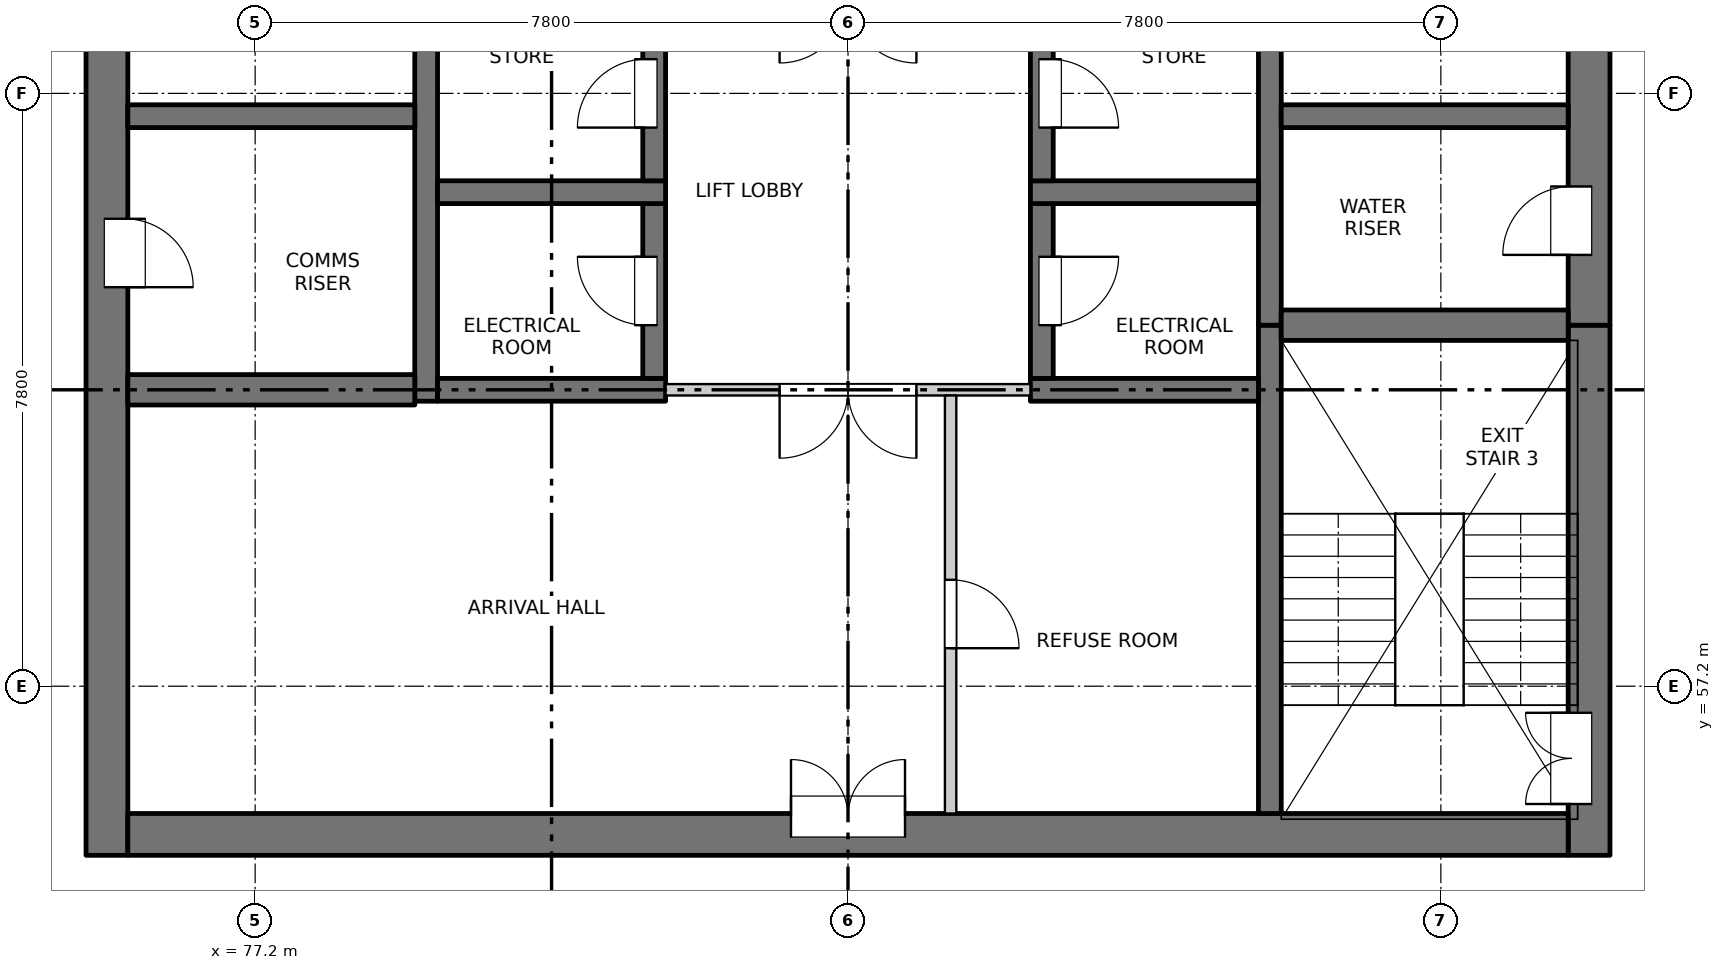
"""IFC4 building model, lengths in metres.
Left out: names, types, materials, properties, quantities, classifications, styles, units other than length and angle.
Written with IfcOpenShell. Run it as: python <this file> out.ifc"""

import sys

from ifc_helpers import new_model, si_unit, direction, frame, frame_2d, origin, place, context, subcontext, project, spatial, rectangle, extrude, element, fill, save


model = new_model("IFC4")
c1 = context("Model", 3, precision=1e-05, world=origin(), true_north=direction((0.0, 1.0)))
c2 = subcontext(c1, "Body", "Model", "MODEL_VIEW")
j1 = project(units=[si_unit("LENGTHUNIT", "METRE"), si_unit("PLANEANGLEUNIT", "RADIAN")], contexts=[c1])
p1 = place(None, origin())
s1 = spatial("IfcSite", under=j1, at=p1, CompositionType="ELEMENT")
p2 = place(p1, origin())
s2 = spatial("IfcBuilding", under=s1, at=p2, CompositionType="ELEMENT")
p3 = place(p2, frame((0.0, 0.0, 189.4)))
s3 = spatial("IfcBuildingStorey", under=s2, at=p3, CompositionType="ELEMENT", Elevation=189.4)
p4 = place(p3, frame((75.25, 54.975, -0.25), z_axis=(0.0, 0.0, 1.0), x_axis=(0.0, 1.0, 0.0)))
e1 = element("IfcWall", 1, at=p4, inside=s3, PredefinedType="SOLIDWALL", context=c2, shape_type="SweptSolid", body=[
    extrude(rectangle(XDim=22.325, YDim=0.55, at=frame_2d((11.163, 0.0))), origin(), (0.0, 0.0, 1.0), 3.35),
])
p5 = place(p4, frame((7.475, 0.0, 0.25)))
e2 = element("IfcOpeningElement", 2, at=p5, cuts=e1, PredefinedType="OPENING", context=c2, shape_type="SweptSolid", body=[
    extrude(rectangle(XDim=0.9, YDim=2.1, at=frame_2d((0.45, 1.05))), frame((0.0, 0.285, 0.0), z_axis=(0.0, -1.0, 0.0), x_axis=(1.0, 0.0, 0.0)), (0.0, 0.0, 1.0), 0.57),
])
p6 = place(p4, frame((10.775, 0.0, 0.25)))
e3 = element("IfcOpeningElement", 3, at=p6, cuts=e1, PredefinedType="OPENING", context=c2, shape_type="SweptSolid", body=[
    extrude(rectangle(XDim=0.9, YDim=2.1, at=frame_2d((0.45, 1.05))), frame((0.0, 0.285, 0.0), z_axis=(0.0, -1.0, 0.0), x_axis=(1.0, 0.0, 0.0)), (0.0, 0.0, 1.0), 0.57),
])
p7 = place(p4, frame((13.775, 0.0, 0.25)))
e4 = element("IfcOpeningElement", 4, at=p7, cuts=e1, PredefinedType="OPENING", context=c2, shape_type="SweptSolid", body=[
    extrude(rectangle(XDim=0.9, YDim=2.1, at=frame_2d((0.45, 1.05))), frame((0.0, 0.285, 0.0), z_axis=(0.0, -1.0, 0.0), x_axis=(1.0, 0.0, 0.0)), (0.0, 0.0, 1.0), 0.57),
])
p8 = place(p4, frame((16.775, 0.0, 0.25)))
e5 = element("IfcOpeningElement", 5, at=p8, cuts=e1, PredefinedType="OPENING", context=c2, shape_type="SweptSolid", body=[
    extrude(rectangle(XDim=0.9, YDim=2.1, at=frame_2d((0.45, 1.05))), frame((0.0, 0.285, 0.0), z_axis=(0.0, -1.0, 0.0), x_axis=(1.0, 0.0, 0.0)), (0.0, 0.0, 1.0), 0.57),
])
p9 = place(p4, frame((20.075, 0.0, 0.25)))
e6 = element("IfcOpeningElement", 6, at=p9, cuts=e1, PredefinedType="OPENING", context=c2, shape_type="SweptSolid", body=[
    extrude(rectangle(XDim=0.9, YDim=2.1, at=frame_2d((0.45, 1.05))), frame((0.0, 0.285, 0.0), z_axis=(0.0, -1.0, 0.0), x_axis=(1.0, 0.0, 0.0)), (0.0, 0.0, 1.0), 0.57),
])
p10 = place(p3, frame((94.75, 54.975, -0.25), z_axis=(0.0, 0.0, 1.0), x_axis=(0.0, 1.0, 0.0)))
e7 = element("IfcWall", 7, at=p10, inside=s3, PredefinedType="SOLIDWALL", context=c2, shape_type="SweptSolid", body=[
    extrude(rectangle(XDim=6.975, YDim=0.55, at=frame_2d((3.487, 0.0))), origin(), (0.0, 0.0, 1.0), 3.35),
])
p11 = place(p10, frame((0.675, 0.0, 0.25)))
e8 = element("IfcOpeningElement", 8, at=p11, cuts=e7, PredefinedType="OPENING", context=c2, shape_type="SweptSolid", body=[
    extrude(rectangle(XDim=1.2, YDim=2.1, at=frame_2d((0.6, 1.05))), frame((0.0, 0.285, 0.0), z_axis=(0.0, -1.0, 0.0), x_axis=(1.0, 0.0, 0.0)), (0.0, 0.0, 1.0), 0.57),
])
p12 = place(p3, frame((94.75, 61.95, -0.25), z_axis=(0.0, 0.0, 1.0), x_axis=(0.0, 1.0, 0.0)))
e9 = element("IfcWall", 9, at=p12, inside=s3, PredefinedType="SOLIDWALL", context=c2, shape_type="SweptSolid", body=[
    extrude(rectangle(XDim=15.35, YDim=0.55, at=frame_2d((7.675, 0.0))), origin(), (0.0, 0.0, 1.0), 3.35),
])
p13 = place(p12, frame((0.925, 0.0, 0.25)))
e10 = element("IfcOpeningElement", 10, at=p13, cuts=e9, PredefinedType="OPENING", context=c2, shape_type="SweptSolid", body=[
    extrude(rectangle(XDim=0.9, YDim=2.1, at=frame_2d((0.45, 1.05))), frame((0.0, 0.285, 0.0), z_axis=(0.0, -1.0, 0.0), x_axis=(1.0, 0.0, 0.0)), (0.0, 0.0, 1.0), 0.57),
])
p14 = place(p12, frame((6.8, 0.0, 0.25)))
e11 = element("IfcOpeningElement", 11, at=p14, cuts=e9, PredefinedType="OPENING", context=c2, shape_type="SweptSolid", body=[
    extrude(rectangle(XDim=0.9, YDim=2.1, at=frame_2d((0.45, 1.05))), frame((0.0, 0.285, 0.0), z_axis=(0.0, -1.0, 0.0), x_axis=(1.0, 0.0, 0.0)), (0.0, 0.0, 1.0), 0.57),
])
p15 = place(p12, frame((13.1, 0.0, 0.25)))
e12 = element("IfcOpeningElement", 12, at=p15, cuts=e9, PredefinedType="OPENING", context=c2, shape_type="SweptSolid", body=[
    extrude(rectangle(XDim=0.9, YDim=2.1, at=frame_2d((0.45, 1.05))), frame((0.0, 0.285, 0.0), z_axis=(0.0, -1.0, 0.0), x_axis=(1.0, 0.0, 0.0)), (0.0, 0.0, 1.0), 0.57),
])
p16 = place(p3, frame((75.525, 55.25, -0.25), z_axis=(0.0, 0.0, 1.0), x_axis=(1.0, 0.0, 0.0)))
e13 = element("IfcWall", 13, at=p16, inside=s3, PredefinedType="SOLIDWALL", context=c2, shape_type="SweptSolid", body=[
    extrude(rectangle(XDim=18.95, YDim=0.55, at=frame_2d((9.475, 0.0))), origin(), (0.0, 0.0, 1.0), 3.35),
])
p17 = place(p16, frame((8.725, 0.0, 0.25)))
e14 = element("IfcOpeningElement", 14, at=p17, cuts=e13, PredefinedType="OPENING", context=c2, shape_type="SweptSolid", body=[
    extrude(rectangle(XDim=1.5, YDim=2.1, at=frame_2d((0.75, 1.05))), frame((0.0, 0.285, 0.0), z_axis=(0.0, -1.0, 0.0), x_axis=(1.0, 0.0, 0.0)), (0.0, 0.0, 1.0), 0.57),
])
p18 = place(p3, frame((79.45, 60.95, -0.25), z_axis=(0.0, 0.0, 1.0), x_axis=(0.0, 1.0, 0.0)))
e15 = element("IfcWall", 15, at=p18, inside=s3, PredefinedType="SOLIDWALL", context=c2, shape_type="SweptSolid", body=[
    extrude(rectangle(XDim=16.35, YDim=0.3, at=frame_2d((8.175, 0.0))), origin(), (0.0, 0.0, 1.0), 3.35),
])
p19 = place(p3, frame((90.55, 55.525, -0.25), z_axis=(0.0, 0.0, 1.0), x_axis=(0.0, 1.0, 0.0)))
e16 = element("IfcWall", 16, at=p19, inside=s3, PredefinedType="SOLIDWALL", context=c2, shape_type="SweptSolid", body=[
    extrude(rectangle(XDim=6.425, YDim=0.3, at=frame_2d((3.212, 0.0))), origin(), (0.0, 0.0, 1.0), 3.35),
])
p20 = place(p3, frame((90.55, 61.95, -0.25), z_axis=(0.0, 0.0, 1.0), x_axis=(0.0, 1.0, 0.0)))
e17 = element("IfcWall", 17, at=p20, inside=s3, PredefinedType="SOLIDWALL", context=c2, shape_type="SweptSolid", body=[
    extrude(rectangle(XDim=15.35, YDim=0.3, at=frame_2d((7.675, 0.0))), origin(), (0.0, 0.0, 1.0), 3.35),
])
p21 = place(p3, frame((79.6, 61.1, -0.25), z_axis=(0.0, 0.0, 1.0), x_axis=(1.0, 0.0, 0.0)))
e18 = element("IfcWall", 18, at=p21, inside=s3, PredefinedType="SOLIDWALL", context=c2, shape_type="SweptSolid", body=[
    extrude(rectangle(XDim=3.0, YDim=0.3, at=frame_2d((1.5, 0.0))), origin(), (0.0, 0.0, 1.0), 3.35),
])
p22 = place(p3, frame((82.45, 61.25, -0.25), z_axis=(0.0, 0.0, 1.0), x_axis=(0.0, 1.0, 0.0)))
e19 = element("IfcWall", 19, at=p22, inside=s3, PredefinedType="SOLIDWALL", context=c2, shape_type="SweptSolid", body=[
    extrude(rectangle(XDim=2.3, YDim=0.3, at=frame_2d((1.15, 0.0))), origin(), (0.0, 0.0, 1.0), 3.35),
])
p23 = place(p22, frame((0.7, 0.0, 0.25)))
e20 = element("IfcOpeningElement", 20, at=p23, cuts=e19, PredefinedType="OPENING", context=c2, shape_type="SweptSolid", body=[
    extrude(rectangle(XDim=0.9, YDim=2.1, at=frame_2d((0.45, 1.05))), frame((0.0, 0.16, 0.0), z_axis=(0.0, -1.0, 0.0), x_axis=(1.0, 0.0, 0.0)), (0.0, 0.0, 1.0), 0.32),
])
p24 = place(p3, frame((79.6, 63.7, -0.25), z_axis=(0.0, 0.0, 1.0), x_axis=(1.0, 0.0, 0.0)))
e21 = element("IfcWall", 21, at=p24, inside=s3, PredefinedType="SOLIDWALL", context=c2, shape_type="SweptSolid", body=[
    extrude(rectangle(XDim=3.0, YDim=0.3, at=frame_2d((1.5, 0.0))), origin(), (0.0, 0.0, 1.0), 3.35),
])
p25 = place(p3, frame((82.45, 63.85, -0.25), z_axis=(0.0, 0.0, 1.0), x_axis=(0.0, 1.0, 0.0)))
e22 = element("IfcWall", 22, at=p25, inside=s3, PredefinedType="SOLIDWALL", context=c2, shape_type="SweptSolid", body=[
    extrude(rectangle(XDim=2.3, YDim=0.3, at=frame_2d((1.15, 0.0))), origin(), (0.0, 0.0, 1.0), 3.35),
])
p26 = place(p25, frame((0.7, 0.0, 0.25)))
e23 = element("IfcOpeningElement", 23, at=p26, cuts=e22, PredefinedType="OPENING", context=c2, shape_type="SweptSolid", body=[
    extrude(rectangle(XDim=0.9, YDim=2.1, at=frame_2d((0.45, 1.05))), frame((0.0, 0.16, 0.0), z_axis=(0.0, -1.0, 0.0), x_axis=(1.0, 0.0, 0.0)), (0.0, 0.0, 1.0), 0.32),
])
p27 = place(p3, frame((87.4, 61.1, -0.25), z_axis=(0.0, 0.0, 1.0), x_axis=(1.0, 0.0, 0.0)))
e24 = element("IfcWall", 24, at=p27, inside=s3, PredefinedType="SOLIDWALL", context=c2, shape_type="SweptSolid", body=[
    extrude(rectangle(XDim=3.0, YDim=0.3, at=frame_2d((1.5, 0.0))), origin(), (0.0, 0.0, 1.0), 3.35),
])
p28 = place(p3, frame((87.55, 61.25, -0.25), z_axis=(0.0, 0.0, 1.0), x_axis=(0.0, 1.0, 0.0)))
e25 = element("IfcWall", 25, at=p28, inside=s3, PredefinedType="SOLIDWALL", context=c2, shape_type="SweptSolid", body=[
    extrude(rectangle(XDim=2.3, YDim=0.3, at=frame_2d((1.15, 0.0))), origin(), (0.0, 0.0, 1.0), 3.35),
])
p29 = place(p28, frame((0.7, 0.0, 0.25)))
e26 = element("IfcOpeningElement", 26, at=p29, cuts=e25, PredefinedType="OPENING", context=c2, shape_type="SweptSolid", body=[
    extrude(rectangle(XDim=0.9, YDim=2.1, at=frame_2d((0.45, 1.05))), frame((0.0, 0.16, 0.0), z_axis=(0.0, -1.0, 0.0), x_axis=(1.0, 0.0, 0.0)), (0.0, 0.0, 1.0), 0.32),
])
p30 = place(p3, frame((87.4, 63.7, -0.25), z_axis=(0.0, 0.0, 1.0), x_axis=(1.0, 0.0, 0.0)))
e27 = element("IfcWall", 27, at=p30, inside=s3, PredefinedType="SOLIDWALL", context=c2, shape_type="SweptSolid", body=[
    extrude(rectangle(XDim=3.0, YDim=0.3, at=frame_2d((1.5, 0.0))), origin(), (0.0, 0.0, 1.0), 3.35),
])
p31 = place(p3, frame((87.55, 63.85, -0.25), z_axis=(0.0, 0.0, 1.0), x_axis=(0.0, 1.0, 0.0)))
e28 = element("IfcWall", 28, at=p31, inside=s3, PredefinedType="SOLIDWALL", context=c2, shape_type="SweptSolid", body=[
    extrude(rectangle(XDim=2.3, YDim=0.3, at=frame_2d((1.15, 0.0))), origin(), (0.0, 0.0, 1.0), 3.35),
])
p32 = place(p31, frame((0.7, 0.0, 0.25)))
e29 = element("IfcOpeningElement", 29, at=p32, cuts=e28, PredefinedType="OPENING", context=c2, shape_type="SweptSolid", body=[
    extrude(rectangle(XDim=0.9, YDim=2.1, at=frame_2d((0.45, 1.05))), frame((0.0, 0.16, 0.0), z_axis=(0.0, -1.0, 0.0), x_axis=(1.0, 0.0, 0.0)), (0.0, 0.0, 1.0), 0.32),
])
p33 = place(p3, frame((75.525, 61.1, -0.25), z_axis=(0.0, 0.0, 1.0), x_axis=(1.0, 0.0, 0.0)))
e30 = element("IfcWall", 30, at=p33, inside=s3, PredefinedType="SOLIDWALL", context=c2, shape_type="SweptSolid", body=[
    extrude(rectangle(XDim=3.775, YDim=0.4, at=frame_2d((1.888, 0.0))), origin(), (0.0, 0.0, 1.0), 3.35),
])
p34 = place(p3, frame((75.525, 64.7, -0.25), z_axis=(0.0, 0.0, 1.0), x_axis=(1.0, 0.0, 0.0)))
e31 = element("IfcWall", 31, at=p34, inside=s3, PredefinedType="SOLIDWALL", context=c2, shape_type="SweptSolid", body=[
    extrude(rectangle(XDim=3.775, YDim=0.3, at=frame_2d((1.888, 0.0))), origin(), (0.0, 0.0, 1.0), 3.35),
])
p35 = place(p3, frame((90.7, 61.95, -0.25), z_axis=(0.0, 0.0, 1.0), x_axis=(1.0, 0.0, 0.0)))
e32 = element("IfcWall", 32, at=p35, inside=s3, PredefinedType="SOLIDWALL", context=c2, shape_type="SweptSolid", body=[
    extrude(rectangle(XDim=3.775, YDim=0.4, at=frame_2d((1.888, 0.0))), origin(), (0.0, 0.0, 1.0), 3.35),
])
p36 = place(p3, frame((90.7, 64.7, -0.25), z_axis=(0.0, 0.0, 1.0), x_axis=(1.0, 0.0, 0.0)))
e33 = element("IfcWall", 33, at=p36, inside=s3, PredefinedType="SOLIDWALL", context=c2, shape_type="SweptSolid", body=[
    extrude(rectangle(XDim=3.775, YDim=0.3, at=frame_2d((1.888, 0.0))), origin(), (0.0, 0.0, 1.0), 3.35),
])
p37 = place(p3, frame((82.6, 61.1, 0.0), z_axis=(0.0, 0.0, 1.0), x_axis=(1.0, 0.0, 0.0)))
e34 = element("IfcWall", 34, at=p37, inside=s3, PredefinedType="PARTITIONING", context=c2, shape_type="SweptSolid", body=[
    extrude(rectangle(XDim=4.8, YDim=0.15, at=frame_2d((2.4, 0.0))), origin(), (0.0, 0.0, 1.0), 3.1),
])
p38 = place(p37, frame((1.5, 0.0, 0.0)))
e35 = element("IfcOpeningElement", 35, at=p38, cuts=e34, PredefinedType="OPENING", context=c2, shape_type="SweptSolid", body=[
    extrude(rectangle(XDim=1.8, YDim=2.1, at=frame_2d((0.9, 1.05))), frame((0.0, 0.085, 0.0), z_axis=(0.0, -1.0, 0.0), x_axis=(1.0, 0.0, 0.0)), (0.0, 0.0, 1.0), 0.17),
])
p39 = place(p3, frame((86.35, 55.525, 0.0), z_axis=(0.0, 0.0, 1.0), x_axis=(0.0, 1.0, 0.0)))
e36 = element("IfcWall", 36, at=p39, inside=s3, PredefinedType="PARTITIONING", context=c2, shape_type="SweptSolid", body=[
    extrude(rectangle(XDim=5.5, YDim=0.15, at=frame_2d((2.75, 0.0))), origin(), (0.0, 0.0, 1.0), 3.1),
])
p40 = place(p39, frame((2.175, 0.0, 0.0)))
e37 = element("IfcOpeningElement", 37, at=p40, cuts=e36, PredefinedType="OPENING", context=c2, shape_type="SweptSolid", body=[
    extrude(rectangle(XDim=0.9, YDim=2.1, at=frame_2d((0.45, 1.05))), frame((0.0, 0.085, 0.0), z_axis=(0.0, -1.0, 0.0), x_axis=(1.0, 0.0, 0.0)), (0.0, 0.0, 1.0), 0.17),
])
p41 = place(p17, origin())
e38 = element("IfcDoor", 38, at=p41, inside=s3, OperationType="DOUBLE_DOOR_SINGLE_SWING", PredefinedType="DOOR", context=c2, shape_type="SweptSolid", body=[
    extrude(rectangle(XDim=1.5, YDim=2.1, at=frame_2d((0.75, 1.05))), frame((0.0, 0.26, 0.0), z_axis=(0.0, -1.0, 0.0), x_axis=(1.0, 0.0, 0.0)), (0.0, 0.0, 1.0), 0.05),
])
fill(e14, e38)
p42 = place(p11, origin())
e39 = element("IfcDoor", 39, at=p42, inside=s3, OperationType="DOUBLE_DOOR_SINGLE_SWING", PredefinedType="DOOR", context=c2, shape_type="SweptSolid", body=[
    extrude(rectangle(XDim=1.2, YDim=2.1, at=frame_2d((0.6, 1.05))), frame((0.0, 0.26, 0.0), z_axis=(0.0, -1.0, 0.0), x_axis=(1.0, 0.0, 0.0)), (0.0, 0.0, 1.0), 0.05),
])
fill(e8, e39)
p43 = place(p40, origin())
e40 = element("IfcDoor", 40, at=p43, inside=s3, OperationType="SINGLE_SWING_RIGHT", PredefinedType="DOOR", context=c2, shape_type="SweptSolid", body=[
    extrude(rectangle(XDim=0.9, YDim=2.1, at=frame_2d((0.45, 1.05))), frame((0.0, 0.025, 0.0), z_axis=(0.0, -1.0, 0.0), x_axis=(1.0, 0.0, 0.0)), (0.0, 0.0, 1.0), 0.05),
])
fill(e37, e40)
p44 = place(p38, origin())
e41 = element("IfcDoor", 41, at=p44, inside=s3, OperationType="DOUBLE_DOOR_SINGLE_SWING", PredefinedType="DOOR", context=c2, shape_type="SweptSolid", body=[
    extrude(rectangle(XDim=1.8, YDim=2.1, at=frame_2d((0.9, 1.05))), frame((0.0, 0.025, 0.0), z_axis=(0.0, -1.0, 0.0), x_axis=(1.0, 0.0, 0.0)), (0.0, 0.0, 1.0), 0.05),
])
fill(e35, e41)
p45 = place(p23, origin())
e42 = element("IfcDoor", 42, at=p45, inside=s3, OperationType="SINGLE_SWING_RIGHT", PredefinedType="DOOR", context=c2, shape_type="SweptSolid", body=[
    extrude(rectangle(XDim=0.9, YDim=2.1, at=frame_2d((0.45, 1.05))), frame((0.0, 0.135, 0.0), z_axis=(0.0, -1.0, 0.0), x_axis=(1.0, 0.0, 0.0)), (0.0, 0.0, 1.0), 0.05),
])
fill(e20, e42)
p46 = place(p29, origin())
e43 = element("IfcDoor", 43, at=p46, inside=s3, OperationType="SINGLE_SWING_LEFT", PredefinedType="DOOR", context=c2, shape_type="SweptSolid", body=[
    extrude(rectangle(XDim=0.9, YDim=2.1, at=frame_2d((0.45, 1.05))), frame((0.0, -0.085, 0.0), z_axis=(0.0, -1.0, 0.0), x_axis=(1.0, 0.0, 0.0)), (0.0, 0.0, 1.0), 0.05),
])
fill(e26, e43)
p47 = place(p5, origin())
e44 = element("IfcDoor", 44, at=p47, inside=s3, OperationType="SINGLE_SWING_RIGHT", PredefinedType="DOOR", context=c2, shape_type="SweptSolid", body=[
    extrude(rectangle(XDim=0.9, YDim=2.1, at=frame_2d((0.45, 1.05))), frame((0.0, -0.21, 0.0), z_axis=(0.0, -1.0, 0.0), x_axis=(1.0, 0.0, 0.0)), (0.0, 0.0, 1.0), 0.05),
])
fill(e2, e44)
p48 = place(p13, origin())
e45 = element("IfcDoor", 45, at=p48, inside=s3, OperationType="SINGLE_SWING_LEFT", PredefinedType="DOOR", context=c2, shape_type="SweptSolid", body=[
    extrude(rectangle(XDim=0.9, YDim=2.1, at=frame_2d((0.45, 1.05))), frame((0.0, 0.26, 0.0), z_axis=(0.0, -1.0, 0.0), x_axis=(1.0, 0.0, 0.0)), (0.0, 0.0, 1.0), 0.05),
])
fill(e10, e45)
p49 = place(p26, origin())
e46 = element("IfcDoor", 46, at=p49, inside=s3, OperationType="SINGLE_SWING_LEFT", PredefinedType="DOOR", context=c2, shape_type="SweptSolid", body=[
    extrude(rectangle(XDim=0.9, YDim=2.1, at=frame_2d((0.45, 1.05))), frame((0.0, 0.135, 0.0), z_axis=(0.0, -1.0, 0.0), x_axis=(1.0, 0.0, 0.0)), (0.0, 0.0, 1.0), 0.05),
])
fill(e23, e46)
p50 = place(p32, origin())
e47 = element("IfcDoor", 47, at=p50, inside=s3, OperationType="SINGLE_SWING_RIGHT", PredefinedType="DOOR", context=c2, shape_type="SweptSolid", body=[
    extrude(rectangle(XDim=0.9, YDim=2.1, at=frame_2d((0.45, 1.05))), frame((0.0, -0.085, 0.0), z_axis=(0.0, -1.0, 0.0), x_axis=(1.0, 0.0, 0.0)), (0.0, 0.0, 1.0), 0.05),
])
fill(e29, e47)
save(model, sys.argv[1])
